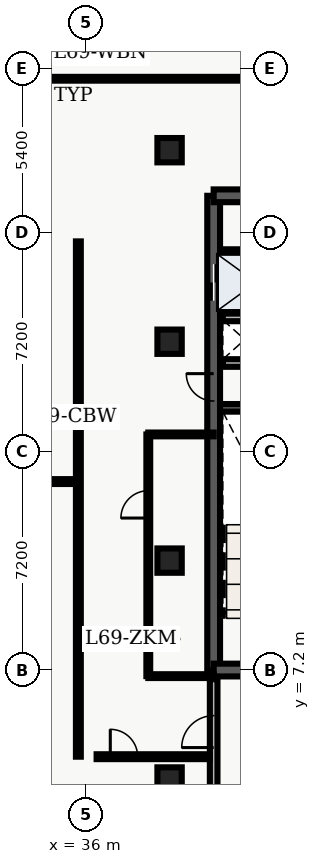
"""IFC4 building model, lengths in metres.
Left out: names, types, materials, properties, quantities, classifications, styles, units other than length and angle.
Written with IfcOpenShell. Run it as: python <this file> out.ifc"""

import sys

from ifc_helpers import new_model, entity, si_unit, converted_unit, direction, frame, origin_with_axes, origin_2d_with_axis, place, context, subcontext, project, spatial, polyline, rectangle, outline, extrude, element, fill, save


model = new_model("IFC4")
c1 = context("Model", 3, precision=1e-05, world=origin_with_axes(), true_north=direction((0.0, 1.0)))
c2 = subcontext(c1, "Body", "Model", "MODEL_VIEW")
j1 = project(units=[si_unit("LENGTHUNIT", "METRE"), converted_unit("PLANEANGLEUNIT", "DEGREE", entity("IfcPlaneAngleMeasure", 0.017), si_unit("PLANEANGLEUNIT", "RADIAN"), dimensions=[0, 0, 0, 0, 0, 0, 0])], contexts=[c1])
p1 = place(None, origin_with_axes())
s1 = spatial("IfcSite", under=j1, at=p1, CompositionType="ELEMENT")
p2 = place(p1, origin_with_axes())
s2 = spatial("IfcBuilding", under=s1, at=p2, CompositionType="ELEMENT")
p3 = place(p2, frame((0.0, 0.0, 280.2), z_axis=(0.0, 0.0, 1.0), x_axis=(1.0, 0.0, 0.0)))
s3 = spatial("IfcBuildingStorey", under=s2, at=p3, CompositionType="ELEMENT", Elevation=280.2)
p4 = place(p3, frame((40.2, 7.2, 0.0), z_axis=(0.0, 0.0, 1.0), x_axis=(0.0, 1.0, 0.0)))
e1 = element("IfcWall", 1, at=p4, inside=s3, PredefinedType="SHEAR", context=c2, shape_type="SweptSolid", body=[
    extrude(outline(polyline([(0.0, -0.21), (15.6, -0.21), (15.6, 0.21), (0.0, 0.21), (0.0, -0.21)])), origin_with_axes(), (0.0, 0.0, 1.0), 3.66),
])
p5 = place(p4, frame((12.75, 0.0, 0.0), z_axis=(0.0, 0.0, 1.0), x_axis=(1.0, 0.0, 0.0)))
e2 = element("IfcOpeningElement", 2, at=p5, cuts=e1, PredefinedType="OPENING", context=c2, shape_type="SweptSolid", body=[
    extrude(rectangle(XDim=1.2, YDim=0.44, at=origin_2d_with_axis()), origin_with_axes(), (0.0, 0.0, 1.0), 2.15),
])
p6 = place(p4, frame((9.3, 0.0, 0.0), z_axis=(0.0, 0.0, 1.0), x_axis=(1.0, 0.0, 0.0)))
e3 = element("IfcOpeningElement", 3, at=p6, cuts=e1, PredefinedType="OPENING", context=c2, shape_type="SweptSolid", body=[
    extrude(rectangle(XDim=0.9, YDim=0.44, at=origin_2d_with_axis()), origin_with_axes(), (0.0, 0.0, 1.0), 2.15),
])
p7 = place(p3, frame((40.2, 7.2, 0.0), z_axis=(0.0, 0.0, 1.0), x_axis=(1.0, 0.0, 0.0)))
e4 = element("IfcWall", 4, at=p7, inside=s3, PredefinedType="SHEAR", context=c2, shape_type="SweptSolid", body=[
    extrude(outline(polyline([(0.0, -0.21), (7.85, -0.21), (7.85, 0.21), (0.0, 0.21), (0.0, -0.21)])), origin_with_axes(), (0.0, 0.0, 1.0), 3.66),
])
p8 = place(p7, frame((2.175, 0.0, 0.0), z_axis=(0.0, 0.0, 1.0), x_axis=(1.0, 0.0, 0.0)))
e5 = element("IfcOpeningElement", 5, at=p8, cuts=e4, PredefinedType="OPENING", context=c2, shape_type="SweptSolid", body=[
    extrude(rectangle(XDim=1.05, YDim=0.44, at=origin_2d_with_axis()), origin_with_axes(), (0.0, 0.0, 1.0), 2.15),
])
p9 = place(p3, frame((40.2, 22.8, 0.0), z_axis=(0.0, 0.0, 1.0), x_axis=(1.0, 0.0, 0.0)))
e6 = element("IfcWall", 6, at=p9, inside=s3, PredefinedType="SHEAR", context=c2, shape_type="SweptSolid", body=[
    extrude(outline(polyline([(0.0, -0.21), (7.85, -0.21), (7.85, 0.21), (0.0, 0.21), (0.0, -0.21)])), origin_with_axes(), (0.0, 0.0, 1.0), 3.66),
])
p10 = place(p9, frame((5.775, 0.0, 0.0), z_axis=(0.0, 0.0, 1.0), x_axis=(1.0, 0.0, 0.0)))
e7 = element("IfcOpeningElement", 7, at=p10, cuts=e6, PredefinedType="OPENING", context=c2, shape_type="SweptSolid", body=[
    extrude(rectangle(XDim=1.05, YDim=0.44, at=origin_2d_with_axis()), origin_with_axes(), (0.0, 0.0, 1.0), 2.15),
])
p11 = place(p9, frame((2.15, 0.0, 0.0), z_axis=(0.0, 0.0, 1.0), x_axis=(1.0, 0.0, 0.0)))
e8 = element("IfcOpeningElement", 8, at=p11, cuts=e6, PredefinedType="OPENING", context=c2, shape_type="SweptSolid", body=[
    extrude(rectangle(XDim=0.9, YDim=0.44, at=origin_2d_with_axis()), origin_with_axes(), (0.0, 0.0, 1.0), 2.15),
])
p12 = place(p3, frame((40.41, 15.825, 0.0), z_axis=(0.0, 0.0, 1.0), x_axis=(1.0, 0.0, 0.0)))
e9 = element("IfcWall", 9, at=p12, inside=s3, PredefinedType="SHEAR", context=c2, shape_type="SweptSolid", body=[
    extrude(outline(polyline([(0.0, -0.125), (3.59, -0.125), (3.59, 0.125), (0.0, 0.125), (0.0, -0.125)])), origin_with_axes(), (0.0, 0.0, 1.0), 3.66),
])
p13 = place(p3, frame((40.5, 17.3, 0.0), z_axis=(0.0, 0.0, 1.0), x_axis=(1.0, 0.0, 0.0)))
e10 = element("IfcWall", 10, at=p13, inside=s3, PredefinedType="SOLIDWALL", context=c2, shape_type="SweptSolid", body=[
    extrude(outline(polyline([(0.0, -0.125), (3.5, -0.125), (3.5, 0.125), (0.0, 0.125), (0.0, -0.125)])), origin_with_axes(), (0.0, 0.0, 1.0), 2.7),
])
p14 = place(p13, frame((2.4, 0.0, 0.0), z_axis=(0.0, 0.0, 1.0), x_axis=(1.0, 0.0, 0.0)))
e11 = element("IfcOpeningElement", 11, at=p14, cuts=e10, PredefinedType="OPENING", context=c2, shape_type="SweptSolid", body=[
    extrude(rectangle(XDim=0.9, YDim=0.27, at=origin_2d_with_axis()), origin_with_axes(), (0.0, 0.0, 1.0), 2.15),
])
p15 = place(p3, frame((40.5, 18.8, 0.0), z_axis=(0.0, 0.0, 1.0), x_axis=(1.0, 0.0, 0.0)))
e12 = element("IfcWall", 12, at=p15, inside=s3, PredefinedType="SOLIDWALL", context=c2, shape_type="SweptSolid", body=[
    extrude(outline(polyline([(0.0, -0.125), (3.5, -0.125), (3.5, 0.125), (0.0, 0.125), (0.0, -0.125)])), origin_with_axes(), (0.0, 0.0, 1.0), 2.7),
])
p16 = place(p3, frame((40.2, 3.1, 0.0), z_axis=(0.0, 0.0, 1.0), x_axis=(0.0, 1.0, 0.0)))
e13 = element("IfcWall", 13, at=p16, inside=s3, PredefinedType="SOLIDWALL", context=c2, shape_type="SweptSolid", body=[
    extrude(outline(polyline([(0.0, -0.125), (3.8, -0.125), (3.8, 0.125), (0.0, 0.125), (0.0, -0.125)])), origin_with_axes(), (0.0, 0.0, 1.0), 2.7),
])
p17 = place(p16, frame((2.075, 0.0, 0.0), z_axis=(0.0, 0.0, 1.0), x_axis=(1.0, 0.0, 0.0)))
e14 = element("IfcOpeningElement", 14, at=p17, cuts=e13, PredefinedType="OPENING", context=c2, shape_type="SweptSolid", body=[
    extrude(rectangle(XDim=1.05, YDim=0.27, at=origin_2d_with_axis()), origin_with_axes(), (0.0, 0.0, 1.0), 2.15),
])
for number, where, z_axis, x_axis in (
    (15, (38.75, 3.6, 0.0), (0.0, 0.0, 1.0), (1.0, 0.0, 0.0)),
    (16, (38.75, 10.8, 0.0), (0.0, 0.0, 1.0), (1.0, 0.0, 0.0)),
    (17, (38.75, 18.0, 0.0), (0.0, 0.0, 1.0), (1.0, 0.0, 0.0)),
    (18, (38.75, 24.3, 0.0), (0.0, 0.0, 1.0), (1.0, 0.0, 0.0)),
):
    element("IfcColumn", number, at=place(p3, frame(where, z_axis=z_axis, x_axis=x_axis)), inside=s3, PredefinedType="COLUMN", context=c2, shape_type="SweptSolid", body=[
        extrude(rectangle(XDim=0.8, YDim=0.8, at=origin_2d_with_axis()), origin_with_axes(), (0.0, 0.0, 1.0), 3.9),
    ])
p18 = place(p3, frame((40.5, 20.96, 0.0), z_axis=(0.0, 0.0, 1.0), x_axis=(1.0, 0.0, 0.0)))
e19 = element("IfcWall", 19, at=p18, inside=s3, PredefinedType="PARTITIONING", context=c2, shape_type="SweptSolid", body=[
    extrude(outline(polyline([(0.0, -0.08), (3.5, -0.08), (3.5, 0.08), (0.0, 0.08), (0.0, -0.08)])), origin_with_axes(), (0.0, 0.0, 1.0), 2.7),
])
p19 = place(p3, frame((20.3, 13.4, 0.0), z_axis=(0.0, 0.0, 1.0), x_axis=(1.0, 0.0, 0.0)))
e20 = element("IfcWall", 20, at=p19, inside=s3, PredefinedType="PARTITIONING", context=c2, shape_type="SweptSolid", body=[
    extrude(outline(polyline([(0.0, -0.08), (15.45, -0.08), (15.45, 0.08), (0.0, 0.08), (0.0, -0.08)])), origin_with_axes(), (0.0, 0.0, 1.0), 2.7),
])
p20 = place(p19, frame((2.304, 0.0, 0.0), z_axis=(0.0, 0.0, 1.0), x_axis=(1.0, 0.0, 0.0)))
e21 = element("IfcOpeningElement", 21, at=p20, cuts=e20, PredefinedType="OPENING", context=c2, shape_type="SweptSolid", body=[
    extrude(rectangle(XDim=1.0, YDim=0.18, at=origin_2d_with_axis()), origin_with_axes(), (0.0, 0.0, 1.0), 2.15),
])
p21 = place(p19, frame((6.866, 0.0, 0.0), z_axis=(0.0, 0.0, 1.0), x_axis=(1.0, 0.0, 0.0)))
e22 = element("IfcOpeningElement", 22, at=p21, cuts=e20, PredefinedType="OPENING", context=c2, shape_type="SweptSolid", body=[
    extrude(rectangle(XDim=1.0, YDim=0.18, at=origin_2d_with_axis()), origin_with_axes(), (0.0, 0.0, 1.0), 2.15),
])
p22 = place(p19, frame((12.337, 0.0, 0.0), z_axis=(0.0, 0.0, 1.0), x_axis=(1.0, 0.0, 0.0)))
e23 = element("IfcOpeningElement", 23, at=p22, cuts=e20, PredefinedType="OPENING", context=c2, shape_type="SweptSolid", body=[
    extrude(rectangle(XDim=1.2, YDim=0.18, at=origin_2d_with_axis()), origin_with_axes(), (0.0, 0.0, 1.0), 2.2),
])
p23 = place(p3, frame((20.3, 15.7, 0.0), z_axis=(0.0, 0.0, 1.0), x_axis=(1.0, 0.0, 0.0)))
e24 = element("IfcWall", 24, at=p23, inside=s3, PredefinedType="PARTITIONING", context=c2, shape_type="SweptSolid", body=[
    extrude(outline(polyline([(0.0, -0.08), (15.45, -0.08), (15.45, 0.08), (0.0, 0.08), (0.0, -0.08)])), origin_with_axes(), (0.0, 0.0, 1.0), 2.7),
])
p24 = place(p23, frame((7.775, 0.0, 0.0), z_axis=(0.0, 0.0, 1.0), x_axis=(1.0, 0.0, 0.0)))
e25 = element("IfcOpeningElement", 25, at=p24, cuts=e24, PredefinedType="OPENING", context=c2, shape_type="SweptSolid", body=[
    extrude(rectangle(XDim=1.0, YDim=0.18, at=origin_2d_with_axis()), origin_with_axes(), (0.0, 0.0, 1.0), 2.15),
])
p25 = place(p3, frame((35.75, 4.35, 0.0), z_axis=(0.0, 0.0, 1.0), x_axis=(0.0, 1.0, 0.0)))
e26 = element("IfcWall", 26, at=p25, inside=s3, PredefinedType="PARTITIONING", context=c2, shape_type="SweptSolid", body=[
    extrude(outline(polyline([(0.0, -0.08), (16.95, -0.08), (16.95, 0.08), (0.0, 0.08), (0.0, -0.08)])), origin_with_axes(), (0.0, 0.0, 1.0), 2.7),
])
p26 = place(p3, frame((34.535, 26.65, 0.0), z_axis=(0.0, 0.0, 1.0), x_axis=(1.0, 0.0, 0.0)))
e27 = element("IfcWall", 27, at=p26, inside=s3, PredefinedType="PARTITIONING", context=c2, shape_type="SweptSolid", body=[
    extrude(outline(polyline([(0.0, -0.062), (12.995, -0.062), (12.995, 0.062), (0.0, 0.062), (0.0, -0.062)])), origin_with_axes(), (0.0, 0.0, 1.0), 2.7),
])
p27 = place(p26, frame((8.465, 0.0, 0.0), z_axis=(0.0, 0.0, 1.0), x_axis=(1.0, 0.0, 0.0)))
e28 = element("IfcOpeningElement", 28, at=p27, cuts=e27, PredefinedType="OPENING", context=c2, shape_type="SweptSolid", body=[
    extrude(rectangle(XDim=1.0, YDim=0.145, at=origin_2d_with_axis()), origin_with_axes(), (0.0, 0.0, 1.0), 2.15),
])
p28 = place(p3, frame((36.35, 4.35, 0.0), z_axis=(0.0, 0.0, 1.0), x_axis=(1.0, 0.0, 0.0)))
e29 = element("IfcWall", 29, at=p28, inside=s3, PredefinedType="PARTITIONING", context=c2, shape_type="SweptSolid", body=[
    extrude(outline(polyline([(0.0, -0.08), (3.725, -0.08), (3.725, 0.08), (0.0, 0.08), (0.0, -0.08)])), origin_with_axes(), (0.0, 0.0, 1.0), 2.7),
])
p29 = place(p28, frame((0.9, 0.0, 0.0), z_axis=(0.0, 0.0, 1.0), x_axis=(1.0, 0.0, 0.0)))
e30 = element("IfcOpeningElement", 30, at=p29, cuts=e29, PredefinedType="OPENING", context=c2, shape_type="SweptSolid", body=[
    extrude(rectangle(XDim=0.9, YDim=0.18, at=origin_2d_with_axis()), origin_with_axes(), (0.0, 0.0, 1.0), 2.15),
])
for number, where, z_axis, x_axis in (
    (31, (38.05, 7.0, 0.0), (0.0, 0.0, 1.0), (1.0, 0.0, 0.0)),
    (32, (38.05, 14.95, 0.0), (0.0, 0.0, 1.0), (1.0, 0.0, 0.0)),
):
    element("IfcWall", number, at=place(p3, frame(where, z_axis=z_axis, x_axis=x_axis)), inside=s3, PredefinedType="PARTITIONING", context=c2, shape_type="SweptSolid", body=[
        extrude(outline(polyline([(0.0, -0.062), (2.15, -0.062), (2.15, 0.062), (0.0, 0.062), (0.0, -0.062)])), origin_with_axes(), (0.0, 0.0, 1.0), 2.7),
    ])
p30 = place(p3, frame((38.05, 7.0, 0.0), z_axis=(0.0, 0.0, 1.0), x_axis=(0.0, 1.0, 0.0)))
e33 = element("IfcWall", 33, at=p30, inside=s3, PredefinedType="PARTITIONING", context=c2, shape_type="SweptSolid", body=[
    extrude(outline(polyline([(0.0, -0.062), (7.95, -0.062), (7.95, 0.062), (0.0, 0.062), (0.0, -0.062)])), origin_with_axes(), (0.0, 0.0, 1.0), 2.7),
])
p31 = place(p30, frame((5.65, 0.0, 0.0), z_axis=(0.0, 0.0, 1.0), x_axis=(1.0, 0.0, 0.0)))
e34 = element("IfcOpeningElement", 34, at=p31, cuts=e33, PredefinedType="OPENING", context=c2, shape_type="SweptSolid", body=[
    extrude(rectangle(XDim=0.9, YDim=0.145, at=origin_2d_with_axis()), origin_with_axes(), (0.0, 0.0, 1.0), 2.15),
])
p32 = place(p4, frame((12.75, 0.0, 0.0), z_axis=(0.0, 0.0, 1.0), x_axis=(1.0, 0.0, 0.0)))
e35 = element("IfcDoor", 35, at=p32, inside=s3, OperationType="DOUBLE_DOOR_SLIDING", PredefinedType="DOOR", context=c2, shape_type="SweptSolid", body=[
    extrude(rectangle(XDim=1.2, YDim=0.09, at=origin_2d_with_axis()), origin_with_axes(), (0.0, 0.0, 1.0), 2.15),
])
fill(e2, e35)
p33 = place(p4, frame((9.3, 0.0, 0.0), z_axis=(0.0, 0.0, 1.0), x_axis=(1.0, 0.0, 0.0)))
e36 = element("IfcDoor", 36, at=p33, inside=s3, OperationType="SINGLE_SWING_RIGHT", PredefinedType="DOOR", context=c2, shape_type="SweptSolid", body=[
    extrude(rectangle(XDim=0.9, YDim=0.09, at=origin_2d_with_axis()), origin_with_axes(), (0.0, 0.0, 1.0), 2.15),
])
fill(e3, e36)
p34 = place(p16, frame((2.075, 0.0, 0.0), z_axis=(0.0, 0.0, 1.0), x_axis=(1.0, 0.0, 0.0)))
e37 = element("IfcDoor", 37, at=p34, inside=s3, OperationType="SINGLE_SWING_LEFT", PredefinedType="DOOR", context=c2, shape_type="SweptSolid", body=[
    extrude(rectangle(XDim=1.05, YDim=0.09, at=origin_2d_with_axis()), origin_with_axes(), (0.0, 0.0, 1.0), 2.15),
])
fill(e14, e37)
p35 = place(p28, frame((0.9, 0.0, 0.0), z_axis=(0.0, 0.0, 1.0), x_axis=(1.0, 0.0, 0.0)))
e38 = element("IfcDoor", 38, at=p35, inside=s3, OperationType="SINGLE_SWING_LEFT", PredefinedType="DOOR", context=c2, shape_type="SweptSolid", body=[
    extrude(rectangle(XDim=0.9, YDim=0.09, at=origin_2d_with_axis()), origin_with_axes(), (0.0, 0.0, 1.0), 2.15),
])
fill(e30, e38)
p36 = place(p30, frame((5.65, 0.0, 0.0), z_axis=(0.0, 0.0, 1.0), x_axis=(1.0, 0.0, 0.0)))
e39 = element("IfcDoor", 39, at=p36, inside=s3, OperationType="SINGLE_SWING_LEFT", PredefinedType="DOOR", context=c2, shape_type="SweptSolid", body=[
    extrude(rectangle(XDim=0.9, YDim=0.075, at=origin_2d_with_axis()), origin_with_axes(), (0.0, 0.0, 1.0), 2.15),
])
fill(e34, e39)
save(model, sys.argv[1])
